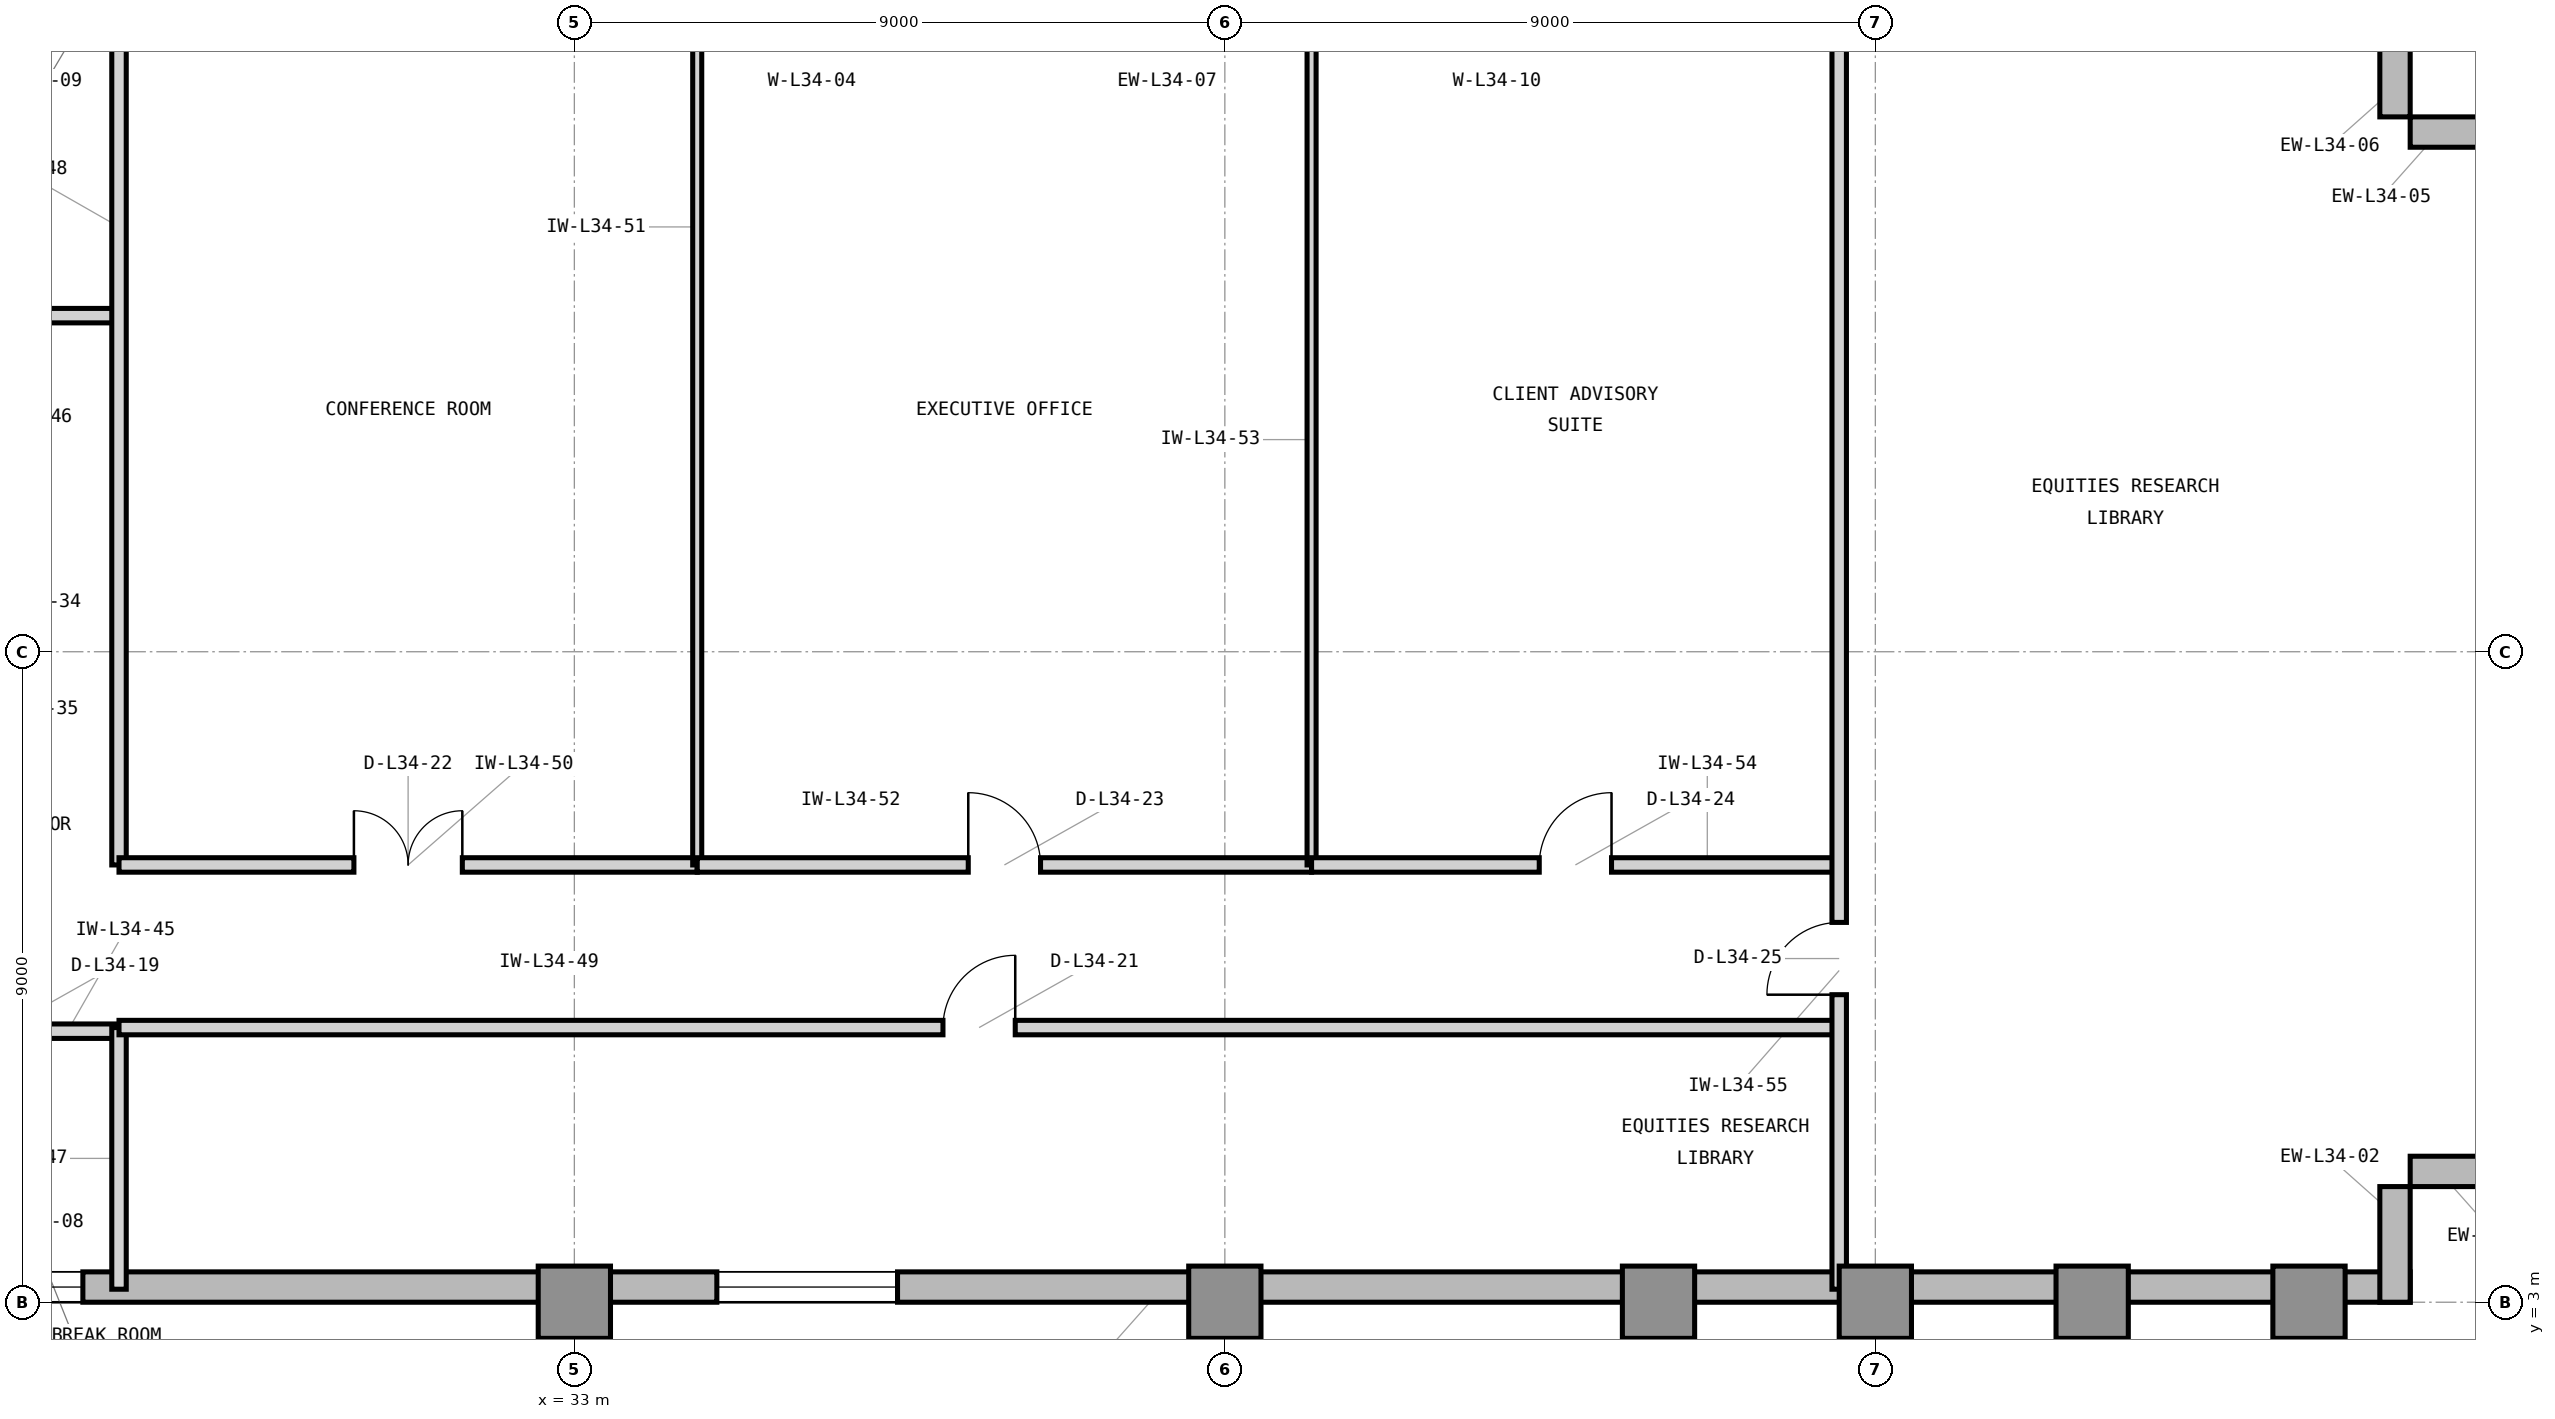
"""IFC4 building model, lengths in metres.
Left out: names, types, materials, properties, quantities, classifications, styles, units other than length and angle.
Written with IfcOpenShell. Run it as: python <this file> out.ifc"""

import sys

from ifc_helpers import new_model, si_unit, direction, frame, frame_2d, origin, origin_2d, place, context, subcontext, project, spatial, rectangle, extrude, element, fill, save


model = new_model("IFC4")
c1 = context("Model", 3, precision=1e-05, world=origin(), true_north=direction((0.0, 1.0)))
c2 = subcontext(c1, "Body", "Model", "MODEL_VIEW")
j1 = project(units=[si_unit("LENGTHUNIT", "METRE"), si_unit("PLANEANGLEUNIT", "RADIAN")], contexts=[c1])
p1 = place(None, origin())
s1 = spatial("IfcSite", under=j1, at=p1, CompositionType="ELEMENT")
p2 = place(p1, origin())
s2 = spatial("IfcBuilding", under=s1, at=p2, CompositionType="ELEMENT")
p3 = place(p2, frame((0.0, 0.0, 144.0)))
s3 = spatial("IfcBuildingStorey", under=s2, at=p3, CompositionType="ELEMENT", Elevation=144.0)
for number, where, z_axis, x_axis in (
    (1, (33.0, 3.0, 0.0), (0.0, 0.0, 1.0), (1.0, 0.0, 0.0)),
    (2, (42.0, 3.0, 0.0), (0.0, 0.0, 1.0), (1.0, 0.0, 0.0)),
    (3, (48.0, 3.0, 0.0), (0.0, 0.0, 1.0), (1.0, 0.0, 0.0)),
    (4, (51.0, 3.0, 0.0), (0.0, 0.0, 1.0), (1.0, 0.0, 0.0)),
    (5, (54.0, 3.0, 0.0), (0.0, 0.0, 1.0), (1.0, 0.0, 0.0)),
    (6, (57.0, 3.0, 0.0), (0.0, 0.0, 1.0), (1.0, 0.0, 0.0)),
):
    element("IfcColumn", number, at=place(p3, frame(where, z_axis=z_axis, x_axis=x_axis)), inside=s3, PredefinedType="COLUMN", context=c2, shape_type="SweptSolid", body=[
        extrude(rectangle(XDim=1.0, YDim=1.0, at=origin_2d()), origin(), (0.0, 0.0, 1.0), 3.9),
    ])
p4 = place(p3, frame((23.9, 3.21, 0.0), z_axis=(0.0, 0.0, 1.0), x_axis=(1.0, 0.0, 0.0)))
e7 = element("IfcWall", 7, at=p4, inside=s3, PredefinedType="STANDARD", context=c2, shape_type="SweptSolid", body=[
    extrude(rectangle(XDim=34.5, YDim=0.42, at=frame_2d((17.25, 0.0))), origin(), (0.0, 0.0, 1.0), 3.7),
])
p5 = place(p4, frame((11.071, 0.0, 0.85)))
e8 = element("IfcOpeningElement", 8, at=p5, cuts=e7, PredefinedType="OPENING", context=c2, shape_type="SweptSolid", body=[
    extrude(rectangle(XDim=2.5, YDim=2.25, at=frame_2d((1.25, 1.125))), frame((0.0, 0.22, 0.0), z_axis=(0.0, -1.0, 0.0), x_axis=(1.0, 0.0, 0.0)), (0.0, 0.0, 1.0), 0.44),
])
p6 = place(p4, frame((1.1, 0.0, 0.85)))
e9 = element("IfcOpeningElement", 9, at=p6, cuts=e7, PredefinedType="OPENING", context=c2, shape_type="SweptSolid", body=[
    extrude(rectangle(XDim=1.2, YDim=2.25, at=frame_2d((0.6, 1.125))), frame((0.0, 0.22, 0.0), z_axis=(0.0, -1.0, 0.0), x_axis=(1.0, 0.0, 0.0)), (0.0, 0.0, 1.0), 0.44),
])
for number, where, z_axis, x_axis in (
    (10, (58.19, 3.0, 0.0), (0.0, 0.0, 1.0), (0.0, 1.0, 0.0)),
    (11, (58.4, 4.81, 0.0), (0.0, 0.0, 1.0), (1.0, 0.0, 0.0)),
    (12, (60.0, 19.19, 0.0), (0.0, 0.0, 1.0), (-1.0, 0.0, 0.0)),
    (13, (58.19, 19.4, 0.0), (0.0, 0.0, 1.0), (0.0, 1.0, 0.0)),
):
    element("IfcWall", number, at=place(p3, frame(where, z_axis=z_axis, x_axis=x_axis)), inside=s3, PredefinedType="STANDARD", context=c2, shape_type="SweptSolid", body=[
        extrude(rectangle(XDim=1.6, YDim=0.42, at=frame_2d((0.8, 0.0))), origin(), (0.0, 0.0, 1.0), 3.7),
    ])
p7 = place(p3, frame((23.85, 6.75, 0.0), z_axis=(0.0, 0.0, 1.0), x_axis=(1.0, 0.0, 0.0)))
e14 = element("IfcWall", 14, at=p7, inside=s3, PredefinedType="PARTITIONING", context=c2, shape_type="SweptSolid", body=[
    extrude(rectangle(XDim=2.85, YDim=0.2, at=frame_2d((1.425, 0.0))), origin(), (0.0, 0.0, 1.0), 3.69),
])
p8 = place(p7, frame((0.7, 0.0, 0.0)))
e15 = element("IfcOpeningElement", 15, at=p8, cuts=e14, PredefinedType="OPENING", context=c2, shape_type="SweptSolid", body=[
    extrude(rectangle(XDim=1.0, YDim=2.15, at=frame_2d((0.5, 1.075))), frame((0.0, 0.11, 0.0), z_axis=(0.0, -1.0, 0.0), x_axis=(1.0, 0.0, 0.0)), (0.0, 0.0, 1.0), 0.22),
])
p9 = place(p3, frame((23.85, 16.65, 0.0), z_axis=(0.0, 0.0, 1.0), x_axis=(1.0, 0.0, 0.0)))
e16 = element("IfcWall", 16, at=p9, inside=s3, PredefinedType="PARTITIONING", context=c2, shape_type="SweptSolid", body=[
    extrude(rectangle(XDim=2.85, YDim=0.2, at=frame_2d((1.425, 0.0))), origin(), (0.0, 0.0, 1.0), 3.69),
])
p10 = place(p9, frame((0.7, 0.0, 0.0)))
e17 = element("IfcOpeningElement", 17, at=p10, cuts=e16, PredefinedType="OPENING", context=c2, shape_type="SweptSolid", body=[
    extrude(rectangle(XDim=1.0, YDim=2.15, at=frame_2d((0.5, 1.075))), frame((0.0, 0.11, 0.0), z_axis=(0.0, -1.0, 0.0), x_axis=(1.0, 0.0, 0.0)), (0.0, 0.0, 1.0), 0.22),
])
p11 = place(p3, frame((26.7, 3.18, 0.0), z_axis=(0.0, 0.0, 1.0), x_axis=(0.0, 1.0, 0.0)))
e18 = element("IfcWall", 18, at=p11, inside=s3, PredefinedType="PARTITIONING", context=c2, shape_type="SweptSolid", body=[
    extrude(rectangle(XDim=3.62, YDim=0.2, at=frame_2d((1.81, 0.0))), origin(), (0.0, 0.0, 1.0), 3.69),
])
p12 = place(p3, frame((26.7, 9.05, 0.0), z_axis=(0.0, 0.0, 1.0), x_axis=(0.0, 1.0, 0.0)))
e19 = element("IfcWall", 19, at=p12, inside=s3, PredefinedType="PARTITIONING", context=c2, shape_type="SweptSolid", body=[
    extrude(rectangle(XDim=11.77, YDim=0.2, at=frame_2d((5.885, 0.0))), origin(), (0.0, 0.0, 1.0), 3.69),
])
p13 = place(p3, frame((26.7, 6.8, 0.0), z_axis=(0.0, 0.0, 1.0), x_axis=(1.0, 0.0, 0.0)))
e20 = element("IfcWall", 20, at=p13, inside=s3, PredefinedType="PARTITIONING", context=c2, shape_type="SweptSolid", body=[
    extrude(rectangle(XDim=23.8, YDim=0.2, at=frame_2d((11.9, 0.0))), origin(), (0.0, 0.0, 1.0), 3.69),
])
p14 = place(p13, frame((11.4, 0.0, 0.0)))
e21 = element("IfcOpeningElement", 21, at=p14, cuts=e20, PredefinedType="OPENING", context=c2, shape_type="SweptSolid", body=[
    extrude(rectangle(XDim=1.0, YDim=2.15, at=frame_2d((0.5, 1.075))), frame((0.0, 0.11, 0.0), z_axis=(0.0, -1.0, 0.0), x_axis=(1.0, 0.0, 0.0)), (0.0, 0.0, 1.0), 0.22),
])
p15 = place(p3, frame((26.7, 9.05, 0.0), z_axis=(0.0, 0.0, 1.0), x_axis=(1.0, 0.0, 0.0)))
e22 = element("IfcWall", 22, at=p15, inside=s3, PredefinedType="PARTITIONING", context=c2, shape_type="SweptSolid", body=[
    extrude(rectangle(XDim=8.0, YDim=0.2, at=frame_2d((4.0, 0.0))), origin(), (0.0, 0.0, 1.0), 3.233),
])
p16 = place(p15, frame((3.25, 0.0, 0.0)))
e23 = element("IfcOpeningElement", 23, at=p16, cuts=e22, PredefinedType="OPENING", context=c2, shape_type="SweptSolid", body=[
    extrude(rectangle(XDim=1.5, YDim=2.3, at=frame_2d((0.75, 1.15))), frame((0.0, 0.11, 0.0), z_axis=(0.0, -1.0, 0.0), x_axis=(1.0, 0.0, 0.0)), (0.0, 0.0, 1.0), 0.22),
])
p17 = place(p3, frame((34.7, 9.05, 0.0), z_axis=(0.0, 0.0, 1.0), x_axis=(0.0, 1.0, 0.0)))
e24 = element("IfcWall", 24, at=p17, inside=s3, PredefinedType="PARTITIONING", context=c2, shape_type="SweptSolid", body=[
    extrude(rectangle(XDim=11.77, YDim=0.125, at=frame_2d((5.885, 0.0))), origin(), (0.0, 0.0, 1.0), 3.69),
])
p18 = place(p3, frame((34.7, 9.05, 0.0), z_axis=(0.0, 0.0, 1.0), x_axis=(1.0, 0.0, 0.0)))
e25 = element("IfcWall", 25, at=p18, inside=s3, PredefinedType="PARTITIONING", context=c2, shape_type="SweptSolid", body=[
    extrude(rectangle(XDim=8.5, YDim=0.2, at=frame_2d((4.25, 0.0))), origin(), (0.0, 0.0, 1.0), 3.233),
])
p19 = place(p18, frame((3.75, 0.0, 0.0)))
e26 = element("IfcOpeningElement", 26, at=p19, cuts=e25, PredefinedType="OPENING", context=c2, shape_type="SweptSolid", body=[
    extrude(rectangle(XDim=1.0, YDim=2.15, at=frame_2d((0.5, 1.075))), frame((0.0, 0.11, 0.0), z_axis=(0.0, -1.0, 0.0), x_axis=(1.0, 0.0, 0.0)), (0.0, 0.0, 1.0), 0.22),
])
p20 = place(p3, frame((43.2, 9.05, 0.0), z_axis=(0.0, 0.0, 1.0), x_axis=(0.0, 1.0, 0.0)))
e27 = element("IfcWall", 27, at=p20, inside=s3, PredefinedType="PARTITIONING", context=c2, shape_type="SweptSolid", body=[
    extrude(rectangle(XDim=11.77, YDim=0.125, at=frame_2d((5.885, 0.0))), origin(), (0.0, 0.0, 1.0), 3.69),
])
p21 = place(p3, frame((43.2, 9.05, 0.0), z_axis=(0.0, 0.0, 1.0), x_axis=(1.0, 0.0, 0.0)))
e28 = element("IfcWall", 28, at=p21, inside=s3, PredefinedType="PARTITIONING", context=c2, shape_type="SweptSolid", body=[
    extrude(rectangle(XDim=7.3, YDim=0.2, at=frame_2d((3.65, 0.0))), origin(), (0.0, 0.0, 1.0), 3.233),
])
p22 = place(p21, frame((3.15, 0.0, 0.0)))
e29 = element("IfcOpeningElement", 29, at=p22, cuts=e28, PredefinedType="OPENING", context=c2, shape_type="SweptSolid", body=[
    extrude(rectangle(XDim=1.0, YDim=2.15, at=frame_2d((0.5, 1.075))), frame((0.0, 0.11, 0.0), z_axis=(0.0, -1.0, 0.0), x_axis=(1.0, 0.0, 0.0)), (0.0, 0.0, 1.0), 0.22),
])
p23 = place(p3, frame((50.5, 3.18, 0.0), z_axis=(0.0, 0.0, 1.0), x_axis=(0.0, 1.0, 0.0)))
e30 = element("IfcWall", 30, at=p23, inside=s3, PredefinedType="PARTITIONING", context=c2, shape_type="SweptSolid", body=[
    extrude(rectangle(XDim=17.64, YDim=0.2, at=frame_2d((8.82, 0.0))), origin(), (0.0, 0.0, 1.0), 3.69),
])
p24 = place(p23, frame((4.075, 0.0, 0.0)))
e31 = element("IfcOpeningElement", 31, at=p24, cuts=e30, PredefinedType="OPENING", context=c2, shape_type="SweptSolid", body=[
    extrude(rectangle(XDim=1.0, YDim=2.15, at=frame_2d((0.5, 1.075))), frame((0.0, 0.11, 0.0), z_axis=(0.0, -1.0, 0.0), x_axis=(1.0, 0.0, 0.0)), (0.0, 0.0, 1.0), 0.22),
])
p25 = place(p5, origin())
e32 = element("IfcWindow", 32, at=p25, inside=s3, PartitioningType="SINGLE_PANEL", PredefinedType="WINDOW", context=c2, shape_type="SweptSolid", body=[
    extrude(rectangle(XDim=2.5, YDim=2.25, at=frame_2d((1.25, 1.125))), frame((0.0, 0.11, 0.0), z_axis=(0.0, -1.0, 0.0), x_axis=(1.0, 0.0, 0.0)), (0.0, 0.0, 1.0), 0.06),
])
fill(e8, e32)
p26 = place(p14, origin())
e33 = element("IfcDoor", 33, at=p26, inside=s3, OperationType="SINGLE_SWING_RIGHT", PredefinedType="DOOR", context=c2, shape_type="SweptSolid", body=[
    extrude(rectangle(XDim=1.0, YDim=2.15, at=frame_2d((0.5, 1.075))), frame((0.0, 0.025, 0.0), z_axis=(0.0, -1.0, 0.0), x_axis=(1.0, 0.0, 0.0)), (0.0, 0.0, 1.0), 0.05),
])
fill(e21, e33)
p27 = place(p16, origin())
e34 = element("IfcDoor", 34, at=p27, inside=s3, OperationType="DOUBLE_DOOR_SINGLE_SWING", PredefinedType="DOOR", context=c2, shape_type="SweptSolid", body=[
    extrude(rectangle(XDim=1.5, YDim=2.3, at=frame_2d((0.75, 1.15))), frame((0.0, 0.025, 0.0), z_axis=(0.0, -1.0, 0.0), x_axis=(1.0, 0.0, 0.0)), (0.0, 0.0, 1.0), 0.05),
])
fill(e23, e34)
p28 = place(p19, origin())
e35 = element("IfcDoor", 35, at=p28, inside=s3, OperationType="SINGLE_SWING_LEFT", PredefinedType="DOOR", context=c2, shape_type="SweptSolid", body=[
    extrude(rectangle(XDim=1.0, YDim=2.15, at=frame_2d((0.5, 1.075))), frame((0.0, 0.025, 0.0), z_axis=(0.0, -1.0, 0.0), x_axis=(1.0, 0.0, 0.0)), (0.0, 0.0, 1.0), 0.05),
])
fill(e26, e35)
p29 = place(p22, origin())
e36 = element("IfcDoor", 36, at=p29, inside=s3, OperationType="SINGLE_SWING_RIGHT", PredefinedType="DOOR", context=c2, shape_type="SweptSolid", body=[
    extrude(rectangle(XDim=1.0, YDim=2.15, at=frame_2d((0.5, 1.075))), frame((0.0, 0.025, 0.0), z_axis=(0.0, -1.0, 0.0), x_axis=(1.0, 0.0, 0.0)), (0.0, 0.0, 1.0), 0.05),
])
fill(e29, e36)
p30 = place(p24, origin())
e37 = element("IfcDoor", 37, at=p30, inside=s3, OperationType="SINGLE_SWING_LEFT", PredefinedType="DOOR", context=c2, shape_type="SweptSolid", body=[
    extrude(rectangle(XDim=1.0, YDim=2.15, at=frame_2d((0.5, 1.075))), frame((0.0, 0.025, 0.0), z_axis=(0.0, -1.0, 0.0), x_axis=(1.0, 0.0, 0.0)), (0.0, 0.0, 1.0), 0.05),
])
fill(e31, e37)
p31 = place(p6, origin())
e38 = element("IfcWindow", 38, at=p31, inside=s3, PartitioningType="SINGLE_PANEL", PredefinedType="WINDOW", context=c2, shape_type="SweptSolid", body=[
    extrude(rectangle(XDim=1.2, YDim=2.25, at=frame_2d((0.6, 1.125))), frame((0.0, 0.11, 0.0), z_axis=(0.0, -1.0, 0.0), x_axis=(1.0, 0.0, 0.0)), (0.0, 0.0, 1.0), 0.06),
])
fill(e9, e38)
save(model, sys.argv[1])
